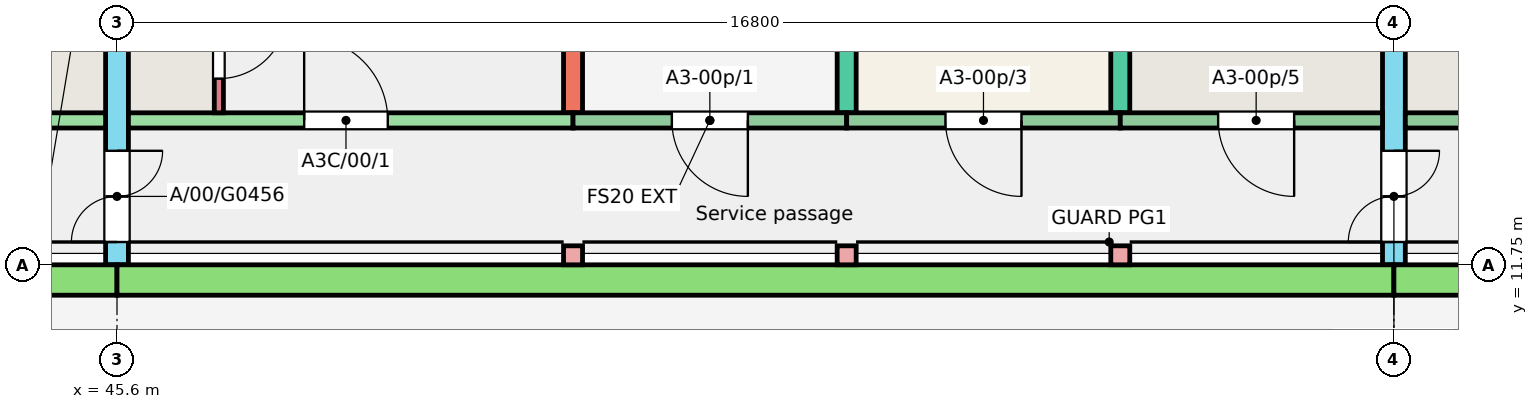
"""IFC4 building model, lengths in metres.
Left out: names, types, materials, properties, quantities, classifications, styles, units other than length and angle.
Written with IfcOpenShell. Run it as: python <this file> out.ifc"""

import sys

from ifc_helpers import new_model, si_unit, direction, frame, frame_2d, origin, origin_2d, place, context, subcontext, project, spatial, rectangle, extrude, element, fill, save


model = new_model("IFC4")
c1 = context("Model", 3, precision=1e-05, world=origin(), true_north=direction((0.0, 1.0)))
c2 = subcontext(c1, "Body", "Model", "MODEL_VIEW")
j1 = project(units=[si_unit("LENGTHUNIT", "METRE"), si_unit("PLANEANGLEUNIT", "RADIAN")], contexts=[c1])
p1 = place(None, origin())
s1 = spatial("IfcSite", under=j1, at=p1, CompositionType="ELEMENT")
p2 = place(p1, origin())
s2 = spatial("IfcBuilding", under=s1, at=p2, CompositionType="ELEMENT")
p3 = place(p2, origin())
s3 = spatial("IfcBuildingStorey", under=s2, at=p3, CompositionType="ELEMENT", Elevation=0.0)
p4 = place(p3, frame((45.6, 11.75, -0.25), z_axis=(0.0, 0.0, 1.0), x_axis=(0.0, 1.0, 0.0)))
e1 = element("IfcWall", 1, at=p4, inside=s3, PredefinedType="SHEAR", context=c2, shape_type="SweptSolid", body=[
    extrude(rectangle(XDim=11.0, YDim=0.3, at=frame_2d((5.5, 0.0))), origin(), (0.0, 0.0, 1.0), 3.25),
])
p5 = place(p4, frame((0.3, 0.0, 0.25)))
e2 = element("IfcOpeningElement", 2, at=p5, cuts=e1, PredefinedType="OPENING", context=c2, shape_type="SweptSolid", body=[
    extrude(rectangle(XDim=1.2, YDim=2.1, at=frame_2d((0.6, 1.05))), frame((0.0, 0.16, 0.0), z_axis=(0.0, -1.0, 0.0), x_axis=(1.0, 0.0, 0.0)), (0.0, 0.0, 1.0), 0.32),
])
for number, where, z_axis, x_axis in (
    (3, (51.6, 13.75, -0.25), (0.0, 0.0, 1.0), (0.0, 1.0, 0.0)),
    (4, (55.2, 13.75, -0.25), (0.0, 0.0, 1.0), (0.0, 1.0, 0.0)),
    (5, (58.8, 13.75, -0.25), (0.0, 0.0, 1.0), (0.0, 1.0, 0.0)),
):
    element("IfcWall", number, at=place(p3, frame(where, z_axis=z_axis, x_axis=x_axis)), inside=s3, PredefinedType="SHEAR", context=c2, shape_type="SweptSolid", body=[
        extrude(rectangle(XDim=9.0, YDim=0.25, at=frame_2d((4.5, 0.0))), origin(), (0.0, 0.0, 1.0), 3.25),
    ])
p6 = place(p3, frame((62.4, 11.75, -0.25), z_axis=(0.0, 0.0, 1.0), x_axis=(0.0, 1.0, 0.0)))
e6 = element("IfcWall", 6, at=p6, inside=s3, PredefinedType="SHEAR", context=c2, shape_type="SweptSolid", body=[
    extrude(rectangle(XDim=11.0, YDim=0.3, at=frame_2d((5.5, 0.0))), origin(), (0.0, 0.0, 1.0), 3.25),
])
p7 = place(p6, frame((0.3, 0.0, 0.25)))
e7 = element("IfcOpeningElement", 7, at=p7, cuts=e6, PredefinedType="OPENING", context=c2, shape_type="SweptSolid", body=[
    extrude(rectangle(XDim=1.2, YDim=2.1, at=frame_2d((0.6, 1.05))), frame((0.0, 0.16, 0.0), z_axis=(0.0, -1.0, 0.0), x_axis=(1.0, 0.0, 0.0)), (0.0, 0.0, 1.0), 0.32),
])
p8 = place(p3, frame((39.6, 13.65, -0.25), z_axis=(0.0, 0.0, 1.0), x_axis=(1.0, 0.0, 0.0)))
e8 = element("IfcWall", 8, at=p8, inside=s3, PredefinedType="SHEAR", context=c2, shape_type="SweptSolid", body=[
    extrude(rectangle(XDim=5.85, YDim=0.2, at=frame_2d((2.925, 0.0))), origin(), (0.0, 0.0, 1.0), 3.25),
])
p9 = place(p8, frame((2.438, 0.0, 0.25)))
e9 = element("IfcOpeningElement", 9, at=p9, cuts=e8, PredefinedType="OPENING", context=c2, shape_type="SweptSolid", body=[
    extrude(rectangle(XDim=1.1, YDim=2.1, at=frame_2d((0.55, 1.05))), frame((0.0, 0.11, 0.0), z_axis=(0.0, -1.0, 0.0), x_axis=(1.0, 0.0, 0.0)), (0.0, 0.0, 1.0), 0.22),
])
p10 = place(p3, frame((45.75, 13.65, -0.25), z_axis=(0.0, 0.0, 1.0), x_axis=(1.0, 0.0, 0.0)))
e10 = element("IfcWall", 10, at=p10, inside=s3, PredefinedType="SHEAR", context=c2, shape_type="SweptSolid", body=[
    extrude(rectangle(XDim=5.85, YDim=0.2, at=frame_2d((2.925, 0.0))), origin(), (0.0, 0.0, 1.0), 3.25),
])
p11 = place(p10, frame((2.312, 0.0, 0.25)))
e11 = element("IfcOpeningElement", 11, at=p11, cuts=e10, PredefinedType="OPENING", context=c2, shape_type="SweptSolid", body=[
    extrude(rectangle(XDim=1.1, YDim=2.1, at=frame_2d((0.55, 1.05))), frame((0.0, 0.11, 0.0), z_axis=(0.0, -1.0, 0.0), x_axis=(1.0, 0.0, 0.0)), (0.0, 0.0, 1.0), 0.22),
])
p12 = place(p3, frame((46.94, 13.75, -0.25), z_axis=(0.0, 0.0, 1.0), x_axis=(0.0, 1.0, 0.0)))
e12 = element("IfcWall", 12, at=p12, inside=s3, PredefinedType="SHEAR", context=c2, shape_type="SweptSolid", body=[
    extrude(rectangle(XDim=1.72, YDim=0.12, at=frame_2d((0.86, 0.0))), origin(), (0.0, 0.0, 1.0), 3.25),
])
p13 = place(p12, frame((0.45, 0.0, 0.25)))
e13 = element("IfcOpeningElement", 13, at=p13, cuts=e12, PredefinedType="OPENING", context=c2, shape_type="SweptSolid", body=[
    extrude(rectangle(XDim=0.9, YDim=2.1, at=frame_2d((0.45, 1.05))), frame((0.0, 0.07, 0.0), z_axis=(0.0, -1.0, 0.0), x_axis=(1.0, 0.0, 0.0)), (0.0, 0.0, 1.0), 0.14),
])
p14 = place(p3, frame((51.6, 13.65, -0.25), z_axis=(0.0, 0.0, 1.0), x_axis=(1.0, 0.0, 0.0)))
e14 = element("IfcWall", 14, at=p14, inside=s3, PredefinedType="SOLIDWALL", context=c2, shape_type="SweptSolid", body=[
    extrude(rectangle(XDim=3.6, YDim=0.2, at=frame_2d((1.8, 0.0))), origin(), (0.0, 0.0, 1.0), 3.25),
])
p15 = place(p14, frame((1.3, 0.0, 0.25)))
e15 = element("IfcOpeningElement", 15, at=p15, cuts=e14, PredefinedType="OPENING", context=c2, shape_type="SweptSolid", body=[
    extrude(rectangle(XDim=1.0, YDim=2.1, at=frame_2d((0.5, 1.05))), frame((0.0, 0.11, 0.0), z_axis=(0.0, -1.0, 0.0), x_axis=(1.0, 0.0, 0.0)), (0.0, 0.0, 1.0), 0.22),
])
p16 = place(p3, frame((55.2, 13.65, -0.25), z_axis=(0.0, 0.0, 1.0), x_axis=(1.0, 0.0, 0.0)))
e16 = element("IfcWall", 16, at=p16, inside=s3, PredefinedType="SOLIDWALL", context=c2, shape_type="SweptSolid", body=[
    extrude(rectangle(XDim=3.6, YDim=0.2, at=frame_2d((1.8, 0.0))), origin(), (0.0, 0.0, 1.0), 3.25),
])
p17 = place(p16, frame((1.3, 0.0, 0.25)))
e17 = element("IfcOpeningElement", 17, at=p17, cuts=e16, PredefinedType="OPENING", context=c2, shape_type="SweptSolid", body=[
    extrude(rectangle(XDim=1.0, YDim=2.1, at=frame_2d((0.5, 1.05))), frame((0.0, 0.11, 0.0), z_axis=(0.0, -1.0, 0.0), x_axis=(1.0, 0.0, 0.0)), (0.0, 0.0, 1.0), 0.22),
])
p18 = place(p3, frame((58.8, 13.65, -0.25), z_axis=(0.0, 0.0, 1.0), x_axis=(1.0, 0.0, 0.0)))
e18 = element("IfcWall", 18, at=p18, inside=s3, PredefinedType="SOLIDWALL", context=c2, shape_type="SweptSolid", body=[
    extrude(rectangle(XDim=3.45, YDim=0.2, at=frame_2d((1.725, 0.0))), origin(), (0.0, 0.0, 1.0), 3.25),
])
p19 = place(p18, frame((1.288, 0.0, 0.25)))
e19 = element("IfcOpeningElement", 19, at=p19, cuts=e18, PredefinedType="OPENING", context=c2, shape_type="SweptSolid", body=[
    extrude(rectangle(XDim=1.0, YDim=2.1, at=frame_2d((0.5, 1.05))), frame((0.0, 0.11, 0.0), z_axis=(0.0, -1.0, 0.0), x_axis=(1.0, 0.0, 0.0)), (0.0, 0.0, 1.0), 0.22),
])
p20 = place(p3, frame((62.55, 13.65, -0.25), z_axis=(0.0, 0.0, 1.0), x_axis=(1.0, 0.0, 0.0)))
e20 = element("IfcWall", 20, at=p20, inside=s3, PredefinedType="SOLIDWALL", context=c2, shape_type="SweptSolid", body=[
    extrude(rectangle(XDim=3.45, YDim=0.2, at=frame_2d((1.725, 0.0))), origin(), (0.0, 0.0, 1.0), 3.25),
])
p21 = place(p20, frame((1.163, 0.0, 0.25)))
e21 = element("IfcOpeningElement", 21, at=p21, cuts=e20, PredefinedType="OPENING", context=c2, shape_type="SweptSolid", body=[
    extrude(rectangle(XDim=1.0, YDim=2.1, at=frame_2d((0.5, 1.05))), frame((0.0, 0.11, 0.0), z_axis=(0.0, -1.0, 0.0), x_axis=(1.0, 0.0, 0.0)), (0.0, 0.0, 1.0), 0.22),
])
for number, where, z_axis, x_axis in (
    (22, (51.6, 11.875, -0.25), (0.0, 0.0, 1.0), (1.0, 0.0, 0.0)),
    (23, (55.2, 11.875, -0.25), (0.0, 0.0, 1.0), (1.0, 0.0, 0.0)),
    (24, (58.8, 11.875, -0.25), (0.0, 0.0, 1.0), (1.0, 0.0, 0.0)),
):
    element("IfcColumn", number, at=place(p3, frame(where, z_axis=z_axis, x_axis=x_axis)), inside=s3, PredefinedType="COLUMN", context=c2, shape_type="SweptSolid", body=[
        extrude(rectangle(XDim=0.25, YDim=0.25, at=origin_2d()), origin(), (0.0, 0.0, 1.0), 3.25),
    ])
p22 = place(p3, frame((28.8, 11.55, -0.25), z_axis=(0.0, 0.0, 1.0), x_axis=(1.0, 0.0, 0.0)))
e25 = element("IfcWall", 25, at=p22, inside=s3, PredefinedType="SOLIDWALL", context=c2, shape_type="SweptSolid", body=[
    extrude(rectangle(XDim=16.8, YDim=0.4, at=frame_2d((8.4, 0.0))), origin(), (0.0, 0.0, 1.0), 3.25),
])
p23 = place(p3, frame((45.6, 11.55, -0.25), z_axis=(0.0, 0.0, 1.0), x_axis=(1.0, 0.0, 0.0)))
e26 = element("IfcWall", 26, at=p23, inside=s3, PredefinedType="SOLIDWALL", context=c2, shape_type="SweptSolid", body=[
    extrude(rectangle(XDim=16.8, YDim=0.4, at=frame_2d((8.4, 0.0))), origin(), (0.0, 0.0, 1.0), 3.25),
])
p24 = place(p3, frame((62.4, 11.55, -0.25), z_axis=(0.0, 0.0, 1.0), x_axis=(1.0, 0.0, 0.0)))
e27 = element("IfcWall", 27, at=p24, inside=s3, PredefinedType="SOLIDWALL", context=c2, shape_type="SweptSolid", body=[
    extrude(rectangle(XDim=16.8, YDim=0.4, at=frame_2d((8.4, 0.0))), origin(), (0.0, 0.0, 1.0), 3.25),
])
p25 = place(p15, origin())
e28 = element("IfcDoor", 28, at=p25, inside=s3, OperationType="SINGLE_SWING_RIGHT", PredefinedType="DOOR", context=c2, shape_type="SweptSolid", body=[
    extrude(rectangle(XDim=1.0, YDim=2.1, at=frame_2d((0.5, 1.05))), frame((0.0, 0.025, 0.0), z_axis=(0.0, -1.0, 0.0), x_axis=(1.0, 0.0, 0.0)), (0.0, 0.0, 1.0), 0.05),
])
fill(e15, e28)
p26 = place(p17, origin())
e29 = element("IfcDoor", 29, at=p26, inside=s3, OperationType="SINGLE_SWING_RIGHT", PredefinedType="DOOR", context=c2, shape_type="SweptSolid", body=[
    extrude(rectangle(XDim=1.0, YDim=2.1, at=frame_2d((0.5, 1.05))), frame((0.0, 0.025, 0.0), z_axis=(0.0, -1.0, 0.0), x_axis=(1.0, 0.0, 0.0)), (0.0, 0.0, 1.0), 0.05),
])
fill(e17, e29)
p27 = place(p19, origin())
e30 = element("IfcDoor", 30, at=p27, inside=s3, OperationType="SINGLE_SWING_RIGHT", PredefinedType="DOOR", context=c2, shape_type="SweptSolid", body=[
    extrude(rectangle(XDim=1.0, YDim=2.1, at=frame_2d((0.5, 1.05))), frame((0.0, 0.025, 0.0), z_axis=(0.0, -1.0, 0.0), x_axis=(1.0, 0.0, 0.0)), (0.0, 0.0, 1.0), 0.05),
])
fill(e19, e30)
p28 = place(p11, origin())
e31 = element("IfcDoor", 31, at=p28, inside=s3, OperationType="SINGLE_SWING_LEFT", PredefinedType="DOOR", context=c2, shape_type="SweptSolid", body=[
    extrude(rectangle(XDim=1.1, YDim=2.1, at=frame_2d((0.55, 1.05))), frame((0.0, 0.025, 0.0), z_axis=(0.0, -1.0, 0.0), x_axis=(1.0, 0.0, 0.0)), (0.0, 0.0, 1.0), 0.05),
])
fill(e11, e31)
p29 = place(p13, origin())
e32 = element("IfcDoor", 32, at=p29, inside=s3, OperationType="SINGLE_SWING_RIGHT", PredefinedType="DOOR", context=c2, shape_type="SweptSolid", body=[
    extrude(rectangle(XDim=0.9, YDim=2.1, at=frame_2d((0.45, 1.05))), frame((0.0, 0.025, 0.0), z_axis=(0.0, -1.0, 0.0), x_axis=(1.0, 0.0, 0.0)), (0.0, 0.0, 1.0), 0.05),
])
fill(e13, e32)
p30 = place(p5, origin())
e33 = element("IfcDoor", 33, at=p30, inside=s3, OperationType="DOUBLE_DOOR_SINGLE_SWING", PredefinedType="DOOR", context=c2, shape_type="SweptSolid", body=[
    extrude(rectangle(XDim=1.2, YDim=2.1, at=frame_2d((0.6, 1.05))), frame((0.0, 0.025, 0.0), z_axis=(0.0, -1.0, 0.0), x_axis=(1.0, 0.0, 0.0)), (0.0, 0.0, 1.0), 0.05),
])
fill(e2, e33)
p31 = place(p7, origin())
e34 = element("IfcDoor", 34, at=p31, inside=s3, OperationType="DOUBLE_DOOR_SINGLE_SWING", PredefinedType="DOOR", context=c2, shape_type="SweptSolid", body=[
    extrude(rectangle(XDim=1.2, YDim=2.1, at=frame_2d((0.6, 1.05))), frame((0.0, 0.025, 0.0), z_axis=(0.0, -1.0, 0.0), x_axis=(1.0, 0.0, 0.0)), (0.0, 0.0, 1.0), 0.05),
])
fill(e7, e34)
save(model, sys.argv[1])
